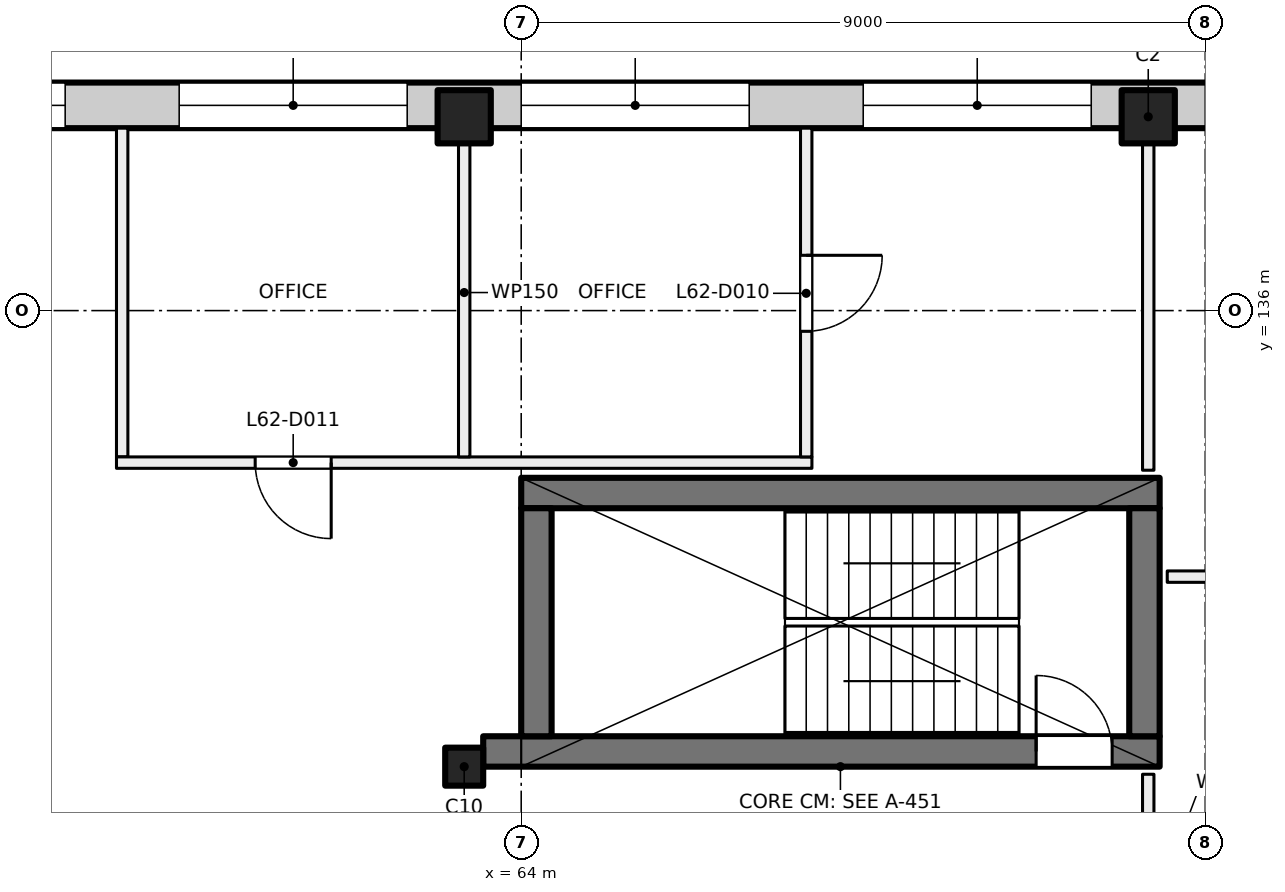
"""IFC4 building model, lengths in metres.
Left out: names, types, materials, properties, quantities, classifications, styles, units other than length and angle.
Written with IfcOpenShell. Run it as: python <this file> out.ifc"""

import sys

from ifc_helpers import new_model, si_unit, direction, frame, frame_2d, origin, origin_2d, place, context, subcontext, project, spatial, rectangle, extrude, element, fill, save


model = new_model("IFC4")
c1 = context("Model", 3, precision=1e-05, world=origin(), true_north=direction((0.0, 1.0)))
c2 = subcontext(c1, "Body", "Model", "MODEL_VIEW")
j1 = project(units=[si_unit("LENGTHUNIT", "METRE"), si_unit("PLANEANGLEUNIT", "RADIAN")], contexts=[c1])
p1 = place(None, origin())
s1 = spatial("IfcSite", under=j1, at=p1, CompositionType="ELEMENT")
p2 = place(p1, origin())
s2 = spatial("IfcBuilding", under=s1, at=p2, CompositionType="ELEMENT")
p3 = place(p2, frame((0.0, 0.0, 261.5)))
s3 = spatial("IfcBuildingStorey", under=s2, at=p3, CompositionType="ELEMENT", Elevation=261.5)
p4 = place(p3, frame((63.25, 130.0, 0.0), z_axis=(0.0, 0.0, 1.0), x_axis=(1.0, 0.0, 0.0)))
e1 = element("IfcColumn", 1, at=p4, inside=s3, PredefinedType="COLUMN", context=c2, shape_type="SweptSolid", body=[
    extrude(rectangle(XDim=0.5, YDim=0.5, at=origin_2d()), origin(), (0.0, 0.0, 1.0), 4.0),
])
for number, where, z_axis, x_axis in (
    (2, (63.25, 138.55, 0.0), (0.0, 0.0, 1.0), (1.0, 0.0, 0.0)),
    (3, (72.25, 138.55, 0.0), (0.0, 0.0, 1.0), (1.0, 0.0, 0.0)),
):
    element("IfcColumn", number, at=place(p3, frame(where, z_axis=z_axis, x_axis=x_axis)), inside=s3, PredefinedType="COLUMN", context=c2, shape_type="SweptSolid", body=[
        extrude(rectangle(XDim=0.7, YDim=0.7, at=origin_2d()), origin(), (0.0, 0.0, 1.0), 4.0),
    ])
p5 = place(p3, frame((63.5, 130.2, 0.0), z_axis=(0.0, 0.0, 1.0), x_axis=(1.0, 0.0, 0.0)))
e4 = element("IfcWall", 4, at=p5, inside=s3, PredefinedType="SHEAR", context=c2, shape_type="SweptSolid", body=[
    extrude(rectangle(XDim=8.9, YDim=0.4, at=frame_2d((4.45, 0.0))), origin(), (0.0, 0.0, 1.0), 4.0),
])
p6 = place(p5, frame((7.275, 0.0, 0.0)))
e5 = element("IfcOpeningElement", 5, at=p6, cuts=e4, PredefinedType="OPENING", context=c2, shape_type="SweptSolid", body=[
    extrude(rectangle(XDim=1.0, YDim=2.1, at=frame_2d((0.5, 1.05))), frame((0.0, 0.21, 0.0), z_axis=(0.0, -1.0, 0.0), x_axis=(1.0, 0.0, 0.0)), (0.0, 0.0, 1.0), 0.42),
])
p7 = place(p3, frame((64.0, 133.6, 0.0), z_axis=(0.0, 0.0, 1.0), x_axis=(1.0, 0.0, 0.0)))
e6 = element("IfcWall", 6, at=p7, inside=s3, PredefinedType="SHEAR", context=c2, shape_type="SweptSolid", body=[
    extrude(rectangle(XDim=8.4, YDim=0.4, at=frame_2d((4.2, 0.0))), origin(), (0.0, 0.0, 1.0), 4.0),
])
for number, where, z_axis, x_axis in (
    (7, (64.2, 130.4, 0.0), (0.0, 0.0, 1.0), (0.0, 1.0, 0.0)),
    (8, (72.2, 130.4, 0.0), (0.0, 0.0, 1.0), (0.0, 1.0, 0.0)),
):
    element("IfcWall", number, at=place(p3, frame(where, z_axis=z_axis, x_axis=x_axis)), inside=s3, PredefinedType="SHEAR", context=c2, shape_type="SweptSolid", body=[
        extrude(rectangle(XDim=3.0, YDim=0.4, at=frame_2d((1.5, 0.0))), origin(), (0.0, 0.0, 1.0), 4.0),
    ])
p8 = place(p3, frame((47.07, 138.7, 0.0), z_axis=(0.0, 0.0, 1.0), x_axis=(1.0, 0.0, 0.0)))
e9 = element("IfcWall", 9, at=p8, inside=s3, PredefinedType="SOLIDWALL", context=c2, shape_type="SweptSolid", body=[
    extrude(rectangle(XDim=43.91, YDim=0.6, at=frame_2d((21.955, 0.0))), origin(), (0.0, 0.0, 1.0), 3.625),
])
p9 = place(p8, frame((3.43, 0.0, 0.9)))
e10 = element("IfcOpeningElement", 10, at=p9, cuts=e9, PredefinedType="OPENING", context=c2, shape_type="SweptSolid", body=[
    extrude(rectangle(XDim=3.0, YDim=2.4, at=frame_2d((1.5, 1.2))), frame((0.0, 0.31, 0.0), z_axis=(0.0, -1.0, 0.0), x_axis=(1.0, 0.0, 0.0)), (0.0, 0.0, 1.0), 0.62),
])
p10 = place(p8, frame((7.93, 0.0, 0.9)))
e11 = element("IfcOpeningElement", 11, at=p10, cuts=e9, PredefinedType="OPENING", context=c2, shape_type="SweptSolid", body=[
    extrude(rectangle(XDim=3.0, YDim=2.4, at=frame_2d((1.5, 1.2))), frame((0.0, 0.31, 0.0), z_axis=(0.0, -1.0, 0.0), x_axis=(1.0, 0.0, 0.0)), (0.0, 0.0, 1.0), 0.62),
])
p11 = place(p8, frame((12.43, 0.0, 0.9)))
e12 = element("IfcOpeningElement", 12, at=p11, cuts=e9, PredefinedType="OPENING", context=c2, shape_type="SweptSolid", body=[
    extrude(rectangle(XDim=3.0, YDim=2.4, at=frame_2d((1.5, 1.2))), frame((0.0, 0.31, 0.0), z_axis=(0.0, -1.0, 0.0), x_axis=(1.0, 0.0, 0.0)), (0.0, 0.0, 1.0), 0.62),
])
p12 = place(p8, frame((16.93, 0.0, 0.9)))
e13 = element("IfcOpeningElement", 13, at=p12, cuts=e9, PredefinedType="OPENING", context=c2, shape_type="SweptSolid", body=[
    extrude(rectangle(XDim=3.0, YDim=2.4, at=frame_2d((1.5, 1.2))), frame((0.0, 0.31, 0.0), z_axis=(0.0, -1.0, 0.0), x_axis=(1.0, 0.0, 0.0)), (0.0, 0.0, 1.0), 0.62),
])
p13 = place(p8, frame((21.43, 0.0, 0.9)))
e14 = element("IfcOpeningElement", 14, at=p13, cuts=e9, PredefinedType="OPENING", context=c2, shape_type="SweptSolid", body=[
    extrude(rectangle(XDim=3.0, YDim=2.4, at=frame_2d((1.5, 1.2))), frame((0.0, 0.31, 0.0), z_axis=(0.0, -1.0, 0.0), x_axis=(1.0, 0.0, 0.0)), (0.0, 0.0, 1.0), 0.62),
])
p14 = place(p8, frame((25.93, 0.0, 0.9)))
e15 = element("IfcOpeningElement", 15, at=p14, cuts=e9, PredefinedType="OPENING", context=c2, shape_type="SweptSolid", body=[
    extrude(rectangle(XDim=3.0, YDim=2.4, at=frame_2d((1.5, 1.2))), frame((0.0, 0.31, 0.0), z_axis=(0.0, -1.0, 0.0), x_axis=(1.0, 0.0, 0.0)), (0.0, 0.0, 1.0), 0.62),
])
p15 = place(p8, frame((30.43, 0.0, 0.9)))
e16 = element("IfcOpeningElement", 16, at=p15, cuts=e9, PredefinedType="OPENING", context=c2, shape_type="SweptSolid", body=[
    extrude(rectangle(XDim=3.0, YDim=2.4, at=frame_2d((1.5, 1.2))), frame((0.0, 0.31, 0.0), z_axis=(0.0, -1.0, 0.0), x_axis=(1.0, 0.0, 0.0)), (0.0, 0.0, 1.0), 0.62),
])
p16 = place(p8, frame((34.93, 0.0, 0.9)))
e17 = element("IfcOpeningElement", 17, at=p16, cuts=e9, PredefinedType="OPENING", context=c2, shape_type="SweptSolid", body=[
    extrude(rectangle(XDim=3.0, YDim=2.4, at=frame_2d((1.5, 1.2))), frame((0.0, 0.31, 0.0), z_axis=(0.0, -1.0, 0.0), x_axis=(1.0, 0.0, 0.0)), (0.0, 0.0, 1.0), 0.62),
])
p17 = place(p8, frame((39.43, 0.0, 0.9)))
e18 = element("IfcOpeningElement", 18, at=p17, cuts=e9, PredefinedType="OPENING", context=c2, shape_type="SweptSolid", body=[
    extrude(rectangle(XDim=3.0, YDim=2.4, at=frame_2d((1.5, 1.2))), frame((0.0, 0.31, 0.0), z_axis=(0.0, -1.0, 0.0), x_axis=(1.0, 0.0, 0.0)), (0.0, 0.0, 1.0), 0.62),
])
p18 = place(p3, frame((58.75, 134.075, 0.0), z_axis=(0.0, 0.0, 1.0), x_axis=(0.0, 1.0, 0.0)))
e19 = element("IfcWall", 19, at=p18, inside=s3, PredefinedType="PARTITIONING", context=c2, shape_type="SweptSolid", body=[
    extrude(rectangle(XDim=4.325, YDim=0.15, at=frame_2d((2.163, 0.0))), origin(), (0.0, 0.0, 1.0), 3.625),
])
p19 = place(p3, frame((67.825, 134.0, 0.0), z_axis=(0.0, 0.0, 1.0), x_axis=(-1.0, 0.0, 0.0)))
e20 = element("IfcWall", 20, at=p19, inside=s3, PredefinedType="PARTITIONING", context=c2, shape_type="SweptSolid", body=[
    extrude(rectangle(XDim=9.15, YDim=0.15, at=frame_2d((4.575, 0.0))), origin(), (0.0, 0.0, 1.0), 3.625),
])
p20 = place(p19, frame((6.325, 0.0, 0.0)))
e21 = element("IfcOpeningElement", 21, at=p20, cuts=e20, PredefinedType="OPENING", context=c2, shape_type="SweptSolid", body=[
    extrude(rectangle(XDim=1.0, YDim=2.1, at=frame_2d((0.5, 1.05))), frame((0.0, 0.085, 0.0), z_axis=(0.0, -1.0, 0.0), x_axis=(1.0, 0.0, 0.0)), (0.0, 0.0, 1.0), 0.17),
])
p21 = place(p3, frame((63.25, 134.075, 0.0), z_axis=(0.0, 0.0, 1.0), x_axis=(0.0, 1.0, 0.0)))
e22 = element("IfcWall", 22, at=p21, inside=s3, PredefinedType="PARTITIONING", context=c2, shape_type="SweptSolid", body=[
    extrude(rectangle(XDim=4.325, YDim=0.15, at=frame_2d((2.163, 0.0))), origin(), (0.0, 0.0, 1.0), 3.625),
])
p22 = place(p3, frame((67.75, 138.4, 0.0), z_axis=(0.0, 0.0, 1.0), x_axis=(0.0, -1.0, 0.0)))
e23 = element("IfcWall", 23, at=p22, inside=s3, PredefinedType="PARTITIONING", context=c2, shape_type="SweptSolid", body=[
    extrude(rectangle(XDim=4.325, YDim=0.15, at=frame_2d((2.163, 0.0))), origin(), (0.0, 0.0, 1.0), 3.625),
])
p23 = place(p22, frame((1.673, 0.0, 0.0)))
e24 = element("IfcOpeningElement", 24, at=p23, cuts=e23, PredefinedType="OPENING", context=c2, shape_type="SweptSolid", body=[
    extrude(rectangle(XDim=1.0, YDim=2.1, at=frame_2d((0.5, 1.05))), frame((0.0, 0.085, 0.0), z_axis=(0.0, -1.0, 0.0), x_axis=(1.0, 0.0, 0.0)), (0.0, 0.0, 1.0), 0.17),
])
p24 = place(p3, frame((72.25, 126.0, 0.0), z_axis=(0.0, 0.0, 1.0), x_axis=(0.0, 1.0, 0.0)))
e25 = element("IfcWall", 25, at=p24, inside=s3, PredefinedType="PARTITIONING", context=c2, shape_type="SweptSolid", body=[
    extrude(rectangle(XDim=3.9, YDim=0.15, at=frame_2d((1.95, 0.0))), origin(), (0.0, 0.0, 1.0), 3.625),
])
p25 = place(p24, frame((1.05, 0.0, 0.0)))
e26 = element("IfcOpeningElement", 26, at=p25, cuts=e25, PredefinedType="OPENING", context=c2, shape_type="SweptSolid", body=[
    extrude(rectangle(XDim=1.8, YDim=2.1, at=frame_2d((0.9, 1.05))), frame((0.0, 0.085, 0.0), z_axis=(0.0, -1.0, 0.0), x_axis=(1.0, 0.0, 0.0)), (0.0, 0.0, 1.0), 0.17),
])
p26 = place(p3, frame((72.25, 133.9, 0.0), z_axis=(0.0, 0.0, 1.0), x_axis=(0.0, 1.0, 0.0)))
e27 = element("IfcWall", 27, at=p26, inside=s3, PredefinedType="PARTITIONING", context=c2, shape_type="SweptSolid", body=[
    extrude(rectangle(XDim=4.5, YDim=0.15, at=frame_2d((2.25, 0.0))), origin(), (0.0, 0.0, 1.0), 3.625),
])
p27 = place(p3, frame((76.675, 132.5, 0.0), z_axis=(0.0, 0.0, 1.0), x_axis=(-1.0, 0.0, 0.0)))
e28 = element("IfcWall", 28, at=p27, inside=s3, PredefinedType="PARTITIONING", context=c2, shape_type="SweptSolid", body=[
    extrude(rectangle(XDim=4.175, YDim=0.15, at=frame_2d((2.087, 0.0))), origin(), (0.0, 0.0, 1.0), 3.625),
])
p28 = place(p10, origin())
e29 = element("IfcWindow", 29, at=p28, inside=s3, PartitioningType="SINGLE_PANEL", PredefinedType="WINDOW", context=c2, shape_type="SweptSolid", body=[
    extrude(rectangle(XDim=3.0, YDim=2.4, at=frame_2d((1.5, 1.2))), frame((0.0, 0.03, 0.0), z_axis=(0.0, -1.0, 0.0), x_axis=(1.0, 0.0, 0.0)), (0.0, 0.0, 1.0), 0.06),
])
fill(e11, e29)
p29 = place(p11, origin())
e30 = element("IfcWindow", 30, at=p29, inside=s3, PartitioningType="SINGLE_PANEL", PredefinedType="WINDOW", context=c2, shape_type="SweptSolid", body=[
    extrude(rectangle(XDim=3.0, YDim=2.4, at=frame_2d((1.5, 1.2))), frame((0.0, 0.03, 0.0), z_axis=(0.0, -1.0, 0.0), x_axis=(1.0, 0.0, 0.0)), (0.0, 0.0, 1.0), 0.06),
])
fill(e12, e30)
p30 = place(p12, origin())
e31 = element("IfcWindow", 31, at=p30, inside=s3, PartitioningType="SINGLE_PANEL", PredefinedType="WINDOW", context=c2, shape_type="SweptSolid", body=[
    extrude(rectangle(XDim=3.0, YDim=2.4, at=frame_2d((1.5, 1.2))), frame((0.0, 0.03, 0.0), z_axis=(0.0, -1.0, 0.0), x_axis=(1.0, 0.0, 0.0)), (0.0, 0.0, 1.0), 0.06),
])
fill(e13, e31)
p31 = place(p13, origin())
e32 = element("IfcWindow", 32, at=p31, inside=s3, PartitioningType="SINGLE_PANEL", PredefinedType="WINDOW", context=c2, shape_type="SweptSolid", body=[
    extrude(rectangle(XDim=3.0, YDim=2.4, at=frame_2d((1.5, 1.2))), frame((0.0, 0.03, 0.0), z_axis=(0.0, -1.0, 0.0), x_axis=(1.0, 0.0, 0.0)), (0.0, 0.0, 1.0), 0.06),
])
fill(e14, e32)
p32 = place(p6, origin())
e33 = element("IfcDoor", 33, at=p32, inside=s3, OperationType="SINGLE_SWING_LEFT", PredefinedType="DOOR", context=c2, shape_type="SweptSolid", body=[
    extrude(rectangle(XDim=1.0, YDim=2.1, at=frame_2d((0.5, 1.05))), frame((0.0, 0.025, 0.0), z_axis=(0.0, -1.0, 0.0), x_axis=(1.0, 0.0, 0.0)), (0.0, 0.0, 1.0), 0.05),
])
fill(e5, e33)
p33 = place(p23, origin())
e34 = element("IfcDoor", 34, at=p33, inside=s3, OperationType="SINGLE_SWING_LEFT", PredefinedType="DOOR", context=c2, shape_type="SweptSolid", body=[
    extrude(rectangle(XDim=1.0, YDim=2.1, at=frame_2d((0.5, 1.05))), frame((0.0, 0.025, 0.0), z_axis=(0.0, -1.0, 0.0), x_axis=(1.0, 0.0, 0.0)), (0.0, 0.0, 1.0), 0.05),
])
fill(e24, e34)
p34 = place(p20, origin())
e35 = element("IfcDoor", 35, at=p34, inside=s3, OperationType="SINGLE_SWING_RIGHT", PredefinedType="DOOR", context=c2, shape_type="SweptSolid", body=[
    extrude(rectangle(XDim=1.0, YDim=2.1, at=frame_2d((0.5, 1.05))), frame((0.0, 0.025, 0.0), z_axis=(0.0, -1.0, 0.0), x_axis=(1.0, 0.0, 0.0)), (0.0, 0.0, 1.0), 0.05),
])
fill(e21, e35)
save(model, sys.argv[1])
